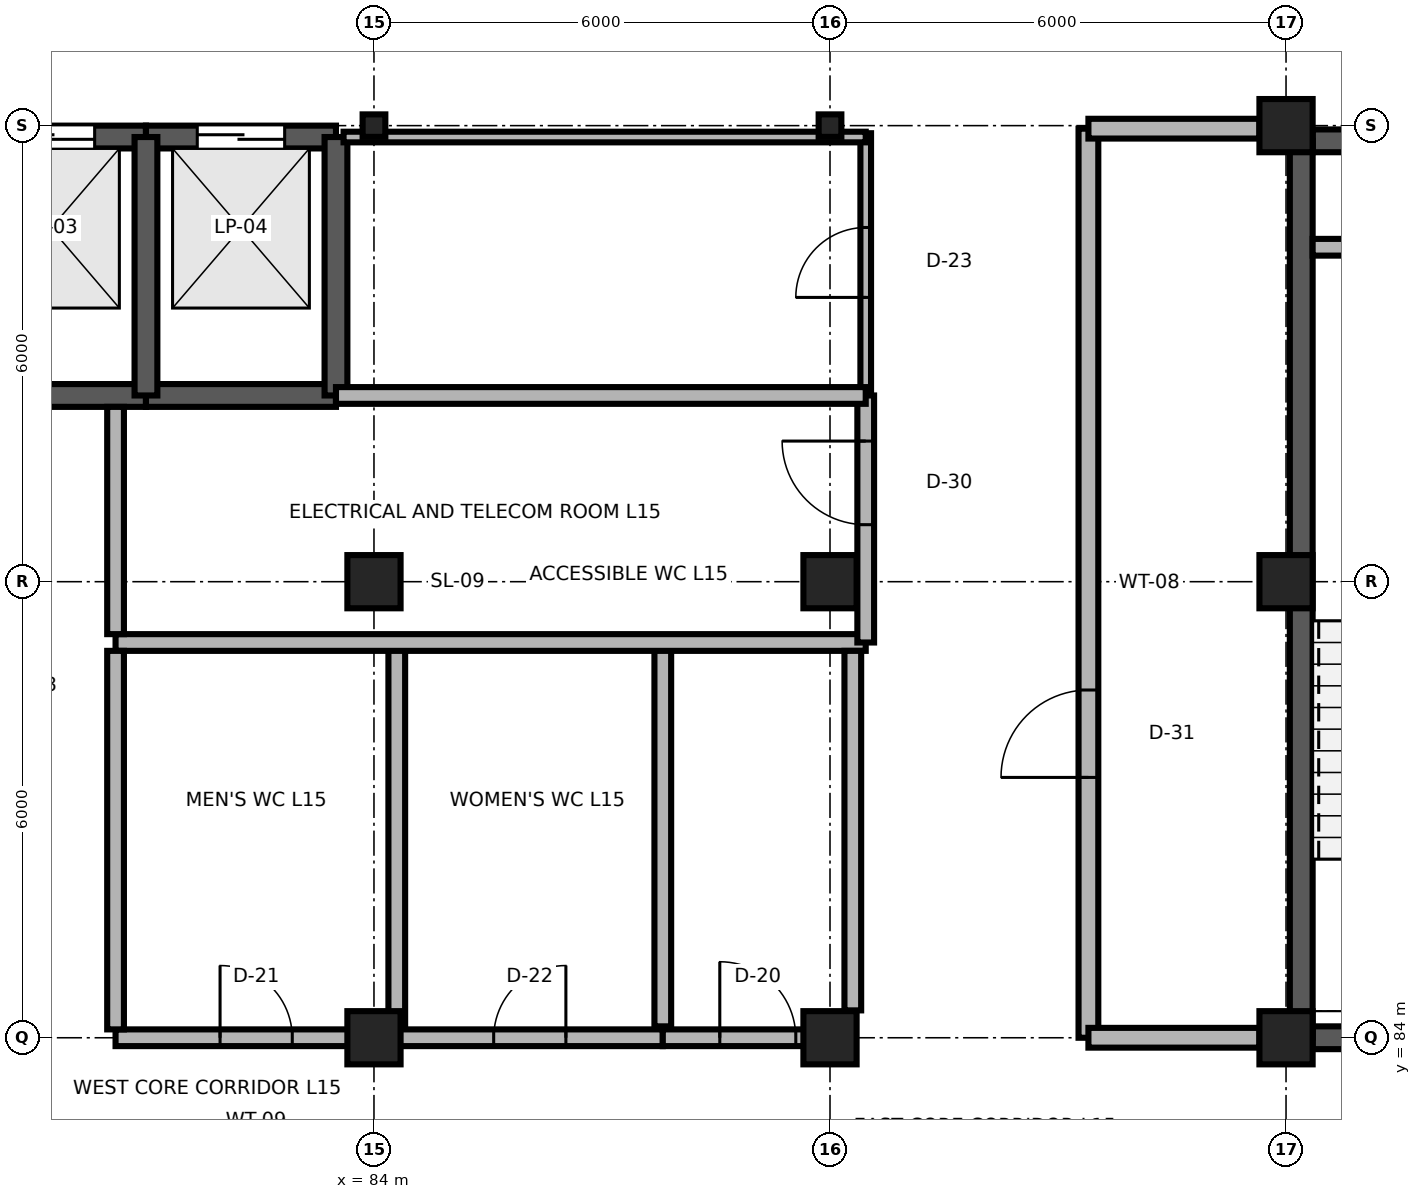
"""IFC4 building model, lengths in metres.
Left out: names, types, materials, properties, quantities, classifications, styles, units other than length and angle.
Written with IfcOpenShell. Run it as: python <this file> out.ifc"""

import sys

from ifc_helpers import new_model, si_unit, direction, frame, frame_2d, origin, origin_2d, place, context, subcontext, project, spatial, rectangle, i_section, extrude, element, fill, save


model = new_model("IFC4")
c1 = context("Model", 3, precision=1e-05, world=origin(), true_north=direction((0.0, 1.0)))
c2 = subcontext(c1, "Body", "Model", "MODEL_VIEW")
j1 = project(units=[si_unit("LENGTHUNIT", "METRE"), si_unit("PLANEANGLEUNIT", "RADIAN")], contexts=[c1])
p1 = place(None, origin())
s1 = spatial("IfcSite", under=j1, at=p1, CompositionType="ELEMENT")
p2 = place(p1, origin())
s2 = spatial("IfcBuilding", under=s1, at=p2, CompositionType="ELEMENT")
p3 = place(p2, frame((0.0, 0.0, 60.0)))
s3 = spatial("IfcBuildingStorey", under=s2, at=p3, CompositionType="ELEMENT", Elevation=60.0)
for number, where, z_axis, x_axis in (
    (1, (84.0, 84.0, 0.0), (0.0, 0.0, 1.0), (1.0, 0.0, 0.0)),
    (2, (90.0, 84.0, 0.0), (0.0, 0.0, 1.0), (1.0, 0.0, 0.0)),
    (3, (96.0, 84.0, 0.0), (0.0, 0.0, 1.0), (1.0, 0.0, 0.0)),
    (4, (84.0, 90.0, 0.0), (0.0, 0.0, 1.0), (1.0, 0.0, 0.0)),
    (5, (90.0, 90.0, 0.0), (0.0, 0.0, 1.0), (1.0, 0.0, 0.0)),
    (6, (96.0, 90.0, 0.0), (0.0, 0.0, 1.0), (1.0, 0.0, 0.0)),
):
    element("IfcColumn", number, at=place(p3, frame(where, z_axis=z_axis, x_axis=x_axis)), inside=s3, PredefinedType="COLUMN", context=c2, shape_type="SweptSolid", body=[
        extrude(rectangle(XDim=0.7, YDim=0.7, at=origin_2d()), origin(), (0.0, 0.0, 1.0), 3.9),
    ])
for number, where, z_axis, x_axis in (
    (7, (84.0, 96.0, 0.0), (0.0, 0.0, 1.0), (1.0, 0.0, 0.0)),
    (8, (90.0, 96.0, 0.0), (0.0, 0.0, 1.0), (1.0, 0.0, 0.0)),
):
    element("IfcColumn", number, at=place(p3, frame(where, z_axis=z_axis, x_axis=x_axis)), inside=s3, PredefinedType="COLUMN", context=c2, shape_type="SweptSolid", body=[
        extrude(i_section(OverallWidth=0.299, OverallDepth=0.296, WebThickness=0.009, FlangeThickness=0.014, FilletRadius=0.018, at=origin_2d()), origin(), (0.0, 0.0, 1.0), 3.9),
    ])
p4 = place(p3, frame((96.0, 96.0, 0.0), z_axis=(0.0, 0.0, 1.0), x_axis=(1.0, 0.0, 0.0)))
e9 = element("IfcColumn", 9, at=p4, inside=s3, PredefinedType="COLUMN", context=c2, shape_type="SweptSolid", body=[
    extrude(rectangle(XDim=0.7, YDim=0.7, at=origin_2d()), origin(), (0.0, 0.0, 1.0), 3.9),
])
p5 = place(p3, frame((96.35, 84.0, 0.0), z_axis=(0.0, 0.0, 1.0), x_axis=(1.0, 0.0, 0.0)))
e10 = element("IfcWall", 10, at=p5, inside=s3, PredefinedType="SHEAR", context=c2, shape_type="SweptSolid", body=[
    extrude(rectangle(XDim=5.3, YDim=0.3, at=frame_2d((2.65, 0.0))), origin(), (0.0, 0.0, 1.0), 3.66),
])
p6 = place(p5, frame((1.975, 0.0, 0.0)))
e11 = element("IfcOpeningElement", 11, at=p6, cuts=e10, PredefinedType="OPENING", context=c2, shape_type="SweptSolid", body=[
    extrude(rectangle(XDim=1.35, YDim=2.2, at=frame_2d((0.675, 1.1))), frame((0.0, 0.165, 0.0), z_axis=(0.0, -1.0, 0.0), x_axis=(1.0, 0.0, 0.0)), (0.0, 0.0, 1.0), 0.33),
])
p7 = place(p3, frame((96.35, 95.8, 0.0), z_axis=(0.0, 0.0, 1.0), x_axis=(1.0, 0.0, 0.0)))
e12 = element("IfcWall", 12, at=p7, inside=s3, PredefinedType="SHEAR", context=c2, shape_type="SweptSolid", body=[
    extrude(rectangle(XDim=5.3, YDim=0.3, at=frame_2d((2.65, 0.0))), origin(), (0.0, 0.0, 1.0), 3.74),
])
p8 = place(p3, frame((96.2, 84.0, 0.0), z_axis=(0.0, 0.0, 1.0), x_axis=(0.0, 1.0, 0.0)))
e13 = element("IfcWall", 13, at=p8, inside=s3, PredefinedType="SHEAR", context=c2, shape_type="SweptSolid", body=[
    extrude(rectangle(XDim=11.8, YDim=0.3, at=frame_2d((5.9, 0.0))), origin(), (0.0, 0.0, 1.0), 3.74),
])
p9 = place(p3, frame((96.35, 94.4, 0.0), z_axis=(0.0, 0.0, 1.0), x_axis=(1.0, 0.0, 0.0)))
e14 = element("IfcWall", 14, at=p9, inside=s3, PredefinedType="PARTITIONING", context=c2, shape_type="SweptSolid", body=[
    extrude(rectangle(XDim=1.1, YDim=0.22, at=frame_2d((0.55, 0.0))), origin(), (0.0, 0.0, 1.0), 3.74),
])
p10 = place(p3, frame((78.5, 95.85, 0.0), z_axis=(0.0, 0.0, 1.0), x_axis=(1.0, 0.0, 0.0)))
e15 = element("IfcWall", 15, at=p10, inside=s3, PredefinedType="SHEAR", context=c2, shape_type="SweptSolid", body=[
    extrude(rectangle(XDim=2.5, YDim=0.3, at=frame_2d((1.25, 0.0))), origin(), (0.0, 0.0, 1.0), 3.74),
])
p11 = place(p10, frame((0.675, 0.0, 0.0)))
e16 = element("IfcOpeningElement", 16, at=p11, cuts=e15, PredefinedType="OPENING", context=c2, shape_type="SweptSolid", body=[
    extrude(rectangle(XDim=1.15, YDim=2.15, at=frame_2d((0.575, 1.075))), frame((0.0, 0.165, 0.0), z_axis=(0.0, -1.0, 0.0), x_axis=(1.0, 0.0, 0.0)), (0.0, 0.0, 1.0), 0.33),
])
p12 = place(p3, frame((78.5, 92.45, 0.0), z_axis=(0.0, 0.0, 1.0), x_axis=(1.0, 0.0, 0.0)))
e17 = element("IfcWall", 17, at=p12, inside=s3, PredefinedType="SHEAR", context=c2, shape_type="SweptSolid", body=[
    extrude(rectangle(XDim=2.5, YDim=0.3, at=frame_2d((1.25, 0.0))), origin(), (0.0, 0.0, 1.0), 3.74),
])
p13 = place(p3, frame((81.0, 95.85, 0.0), z_axis=(0.0, 0.0, 1.0), x_axis=(1.0, 0.0, 0.0)))
e18 = element("IfcWall", 18, at=p13, inside=s3, PredefinedType="SHEAR", context=c2, shape_type="SweptSolid", body=[
    extrude(rectangle(XDim=2.5, YDim=0.3, at=frame_2d((1.25, 0.0))), origin(), (0.0, 0.0, 1.0), 3.74),
])
p14 = place(p13, frame((0.675, 0.0, 0.0)))
e19 = element("IfcOpeningElement", 19, at=p14, cuts=e18, PredefinedType="OPENING", context=c2, shape_type="SweptSolid", body=[
    extrude(rectangle(XDim=1.15, YDim=2.15, at=frame_2d((0.575, 1.075))), frame((0.0, 0.165, 0.0), z_axis=(0.0, -1.0, 0.0), x_axis=(1.0, 0.0, 0.0)), (0.0, 0.0, 1.0), 0.33),
])
p15 = place(p3, frame((81.0, 92.45, 0.0), z_axis=(0.0, 0.0, 1.0), x_axis=(1.0, 0.0, 0.0)))
e20 = element("IfcWall", 20, at=p15, inside=s3, PredefinedType="SHEAR", context=c2, shape_type="SweptSolid", body=[
    extrude(rectangle(XDim=2.5, YDim=0.3, at=frame_2d((1.25, 0.0))), origin(), (0.0, 0.0, 1.0), 3.74),
])
for number, where, z_axis, x_axis in (
    (21, (81.0, 92.45, 0.0), (0.0, 0.0, 1.0), (0.0, 1.0, 0.0)),
    (22, (83.5, 92.45, 0.0), (0.0, 0.0, 1.0), (0.0, 1.0, 0.0)),
):
    element("IfcWall", number, at=place(p3, frame(where, z_axis=z_axis, x_axis=x_axis)), inside=s3, PredefinedType="SHEAR", context=c2, shape_type="SweptSolid", body=[
        extrude(rectangle(XDim=3.4, YDim=0.3, at=frame_2d((1.7, 0.0))), origin(), (0.0, 0.0, 1.0), 3.74),
    ])
p16 = place(p3, frame((93.4, 84.0, 0.0), z_axis=(0.0, 0.0, 1.0), x_axis=(0.0, 1.0, 0.0)))
e23 = element("IfcWall", 23, at=p16, inside=s3, PredefinedType="PARTITIONING", context=c2, shape_type="SweptSolid", body=[
    extrude(rectangle(XDim=11.96, YDim=0.26, at=frame_2d((5.98, 0.0))), origin(), (0.0, 0.0, 1.0), 3.74),
])
p17 = place(p16, frame((3.425, 0.0, 0.0)))
e24 = element("IfcOpeningElement", 24, at=p17, cuts=e23, PredefinedType="OPENING", context=c2, shape_type="SweptSolid", body=[
    extrude(rectangle(XDim=1.15, YDim=2.2, at=frame_2d((0.575, 1.1))), frame((0.0, 0.145, 0.0), z_axis=(0.0, -1.0, 0.0), x_axis=(1.0, 0.0, 0.0)), (0.0, 0.0, 1.0), 0.29),
])
for number, where, z_axis, x_axis in (
    (25, (93.4, 84.0, 0.0), (0.0, 0.0, 1.0), (1.0, 0.0, 0.0)),
    (26, (93.4, 95.96, 0.0), (0.0, 0.0, 1.0), (1.0, 0.0, 0.0)),
):
    element("IfcWall", number, at=place(p3, frame(where, z_axis=z_axis, x_axis=x_axis)), inside=s3, PredefinedType="PARTITIONING", context=c2, shape_type="SweptSolid", body=[
        extrude(rectangle(XDim=2.25, YDim=0.26, at=frame_2d((1.125, 0.0))), origin(), (0.0, 0.0, 1.0), 3.449),
    ])
p18 = place(p3, frame((80.6, 84.0, 0.0), z_axis=(0.0, 0.0, 1.0), x_axis=(1.0, 0.0, 0.0)))
e27 = element("IfcWall", 27, at=p18, inside=s3, PredefinedType="PARTITIONING", context=c2, shape_type="SweptSolid", body=[
    extrude(rectangle(XDim=3.7, YDim=0.22, at=frame_2d((1.85, 0.0))), origin(), (0.0, 0.0, 1.0), 3.449),
])
p19 = place(p18, frame((1.375, 0.0, 0.0)))
e28 = element("IfcOpeningElement", 28, at=p19, cuts=e27, PredefinedType="OPENING", context=c2, shape_type="SweptSolid", body=[
    extrude(rectangle(XDim=0.95, YDim=2.15, at=frame_2d((0.475, 1.075))), frame((0.0, 0.125, 0.0), z_axis=(0.0, -1.0, 0.0), x_axis=(1.0, 0.0, 0.0)), (0.0, 0.0, 1.0), 0.25),
])
p20 = place(p3, frame((84.3, 84.0, 0.0), z_axis=(0.0, 0.0, 1.0), x_axis=(1.0, 0.0, 0.0)))
e29 = element("IfcWall", 29, at=p20, inside=s3, PredefinedType="PARTITIONING", context=c2, shape_type="SweptSolid", body=[
    extrude(rectangle(XDim=3.5, YDim=0.22, at=frame_2d((1.75, 0.0))), origin(), (0.0, 0.0, 1.0), 3.449),
])
p21 = place(p20, frame((1.275, 0.0, 0.0)))
e30 = element("IfcOpeningElement", 30, at=p21, cuts=e29, PredefinedType="OPENING", context=c2, shape_type="SweptSolid", body=[
    extrude(rectangle(XDim=0.95, YDim=2.1, at=frame_2d((0.475, 1.05))), frame((0.0, 0.125, 0.0), z_axis=(0.0, -1.0, 0.0), x_axis=(1.0, 0.0, 0.0)), (0.0, 0.0, 1.0), 0.25),
])
p22 = place(p3, frame((87.8, 84.0, 0.0), z_axis=(0.0, 0.0, 1.0), x_axis=(1.0, 0.0, 0.0)))
e31 = element("IfcWall", 31, at=p22, inside=s3, PredefinedType="PARTITIONING", context=c2, shape_type="SweptSolid", body=[
    extrude(rectangle(XDim=2.5, YDim=0.22, at=frame_2d((1.25, 0.0))), origin(), (0.0, 0.0, 1.0), 3.449),
])
p23 = place(p22, frame((0.75, 0.0, 0.0)))
e32 = element("IfcOpeningElement", 32, at=p23, cuts=e31, PredefinedType="OPENING", context=c2, shape_type="SweptSolid", body=[
    extrude(rectangle(XDim=1.0, YDim=2.15, at=frame_2d((0.5, 1.075))), frame((0.0, 0.125, 0.0), z_axis=(0.0, -1.0, 0.0), x_axis=(1.0, 0.0, 0.0)), (0.0, 0.0, 1.0), 0.25),
])
for number, where, z_axis, x_axis in (
    (33, (84.3, 84.15, 0.0), (0.0, 0.0, 1.0), (0.0, 1.0, 0.0)),
    (34, (87.8, 84.15, 0.0), (0.0, 0.0, 1.0), (0.0, 1.0, 0.0)),
):
    element("IfcWall", number, at=place(p3, frame(where, z_axis=z_axis, x_axis=x_axis)), inside=s3, PredefinedType="PARTITIONING", context=c2, shape_type="SweptSolid", body=[
        extrude(rectangle(XDim=5.0, YDim=0.22, at=frame_2d((2.5, 0.0))), origin(), (0.0, 0.0, 1.0), 3.74),
    ])
p24 = place(p3, frame((80.6, 89.2, 0.0), z_axis=(0.0, 0.0, 1.0), x_axis=(1.0, 0.0, 0.0)))
e35 = element("IfcWall", 35, at=p24, inside=s3, PredefinedType="PARTITIONING", context=c2, shape_type="SweptSolid", body=[
    extrude(rectangle(XDim=9.87, YDim=0.22, at=frame_2d((4.935, 0.0))), origin(), (0.0, 0.0, 1.0), 3.74),
])
p25 = place(p3, frame((90.47, 89.2, 0.0), z_axis=(0.0, 0.0, 1.0), x_axis=(0.0, 1.0, 0.0)))
e36 = element("IfcWall", 36, at=p25, inside=s3, PredefinedType="PARTITIONING", context=c2, shape_type="SweptSolid", body=[
    extrude(rectangle(XDim=3.25, YDim=0.22, at=frame_2d((1.625, 0.0))), origin(), (0.0, 0.0, 1.0), 3.74),
])
p26 = place(p25, frame((1.55, 0.0, 0.0)))
e37 = element("IfcOpeningElement", 37, at=p26, cuts=e36, PredefinedType="OPENING", context=c2, shape_type="SweptSolid", body=[
    extrude(rectangle(XDim=1.1, YDim=2.15, at=frame_2d((0.55, 1.075))), frame((0.0, 0.125, 0.0), z_axis=(0.0, -1.0, 0.0), x_axis=(1.0, 0.0, 0.0)), (0.0, 0.0, 1.0), 0.25),
])
p27 = place(p3, frame((90.47, 92.5, 0.0), z_axis=(0.0, 0.0, 1.0), x_axis=(0.0, 1.0, 0.0)))
e38 = element("IfcWall", 38, at=p27, inside=s3, PredefinedType="PARTITIONING", context=c2, shape_type="SweptSolid", body=[
    extrude(rectangle(XDim=3.4, YDim=0.14, at=frame_2d((1.7, 0.0))), origin(), (0.0, 0.0, 1.0), 3.74),
])
p28 = place(p27, frame((1.24, 0.0, 0.0)))
e39 = element("IfcOpeningElement", 39, at=p28, cuts=e38, PredefinedType="OPENING", context=c2, shape_type="SweptSolid", body=[
    extrude(rectangle(XDim=0.92, YDim=2.15, at=frame_2d((0.46, 1.075))), frame((0.0, 0.085, 0.0), z_axis=(0.0, -1.0, 0.0), x_axis=(1.0, 0.0, 0.0)), (0.0, 0.0, 1.0), 0.17),
])
p29 = place(p3, frame((83.6, 95.85, 0.0), z_axis=(0.0, 0.0, 1.0), x_axis=(1.0, 0.0, 0.0)))
e40 = element("IfcWall", 40, at=p29, inside=s3, PredefinedType="PARTITIONING", context=c2, shape_type="SweptSolid", body=[
    extrude(rectangle(XDim=6.87, YDim=0.14, at=frame_2d((3.435, 0.0))), origin(), (0.0, 0.0, 1.0), 3.74),
])
p30 = place(p3, frame((80.6, 84.11, 0.0), z_axis=(0.0, 0.0, 1.0), x_axis=(0.0, 1.0, 0.0)))
e41 = element("IfcWall", 41, at=p30, inside=s3, PredefinedType="PARTITIONING", context=c2, shape_type="SweptSolid", body=[
    extrude(rectangle(XDim=4.98, YDim=0.22, at=frame_2d((2.49, 0.0))), origin(), (0.0, 0.0, 1.0), 3.74),
])
p31 = place(p3, frame((90.3, 84.36, 0.0), z_axis=(0.0, 0.0, 1.0), x_axis=(0.0, 1.0, 0.0)))
e42 = element("IfcWall", 42, at=p31, inside=s3, PredefinedType="PARTITIONING", context=c2, shape_type="SweptSolid", body=[
    extrude(rectangle(XDim=4.73, YDim=0.22, at=frame_2d((2.365, 0.0))), origin(), (0.0, 0.0, 1.0), 3.74),
])
p32 = place(p3, frame((80.6, 89.31, 0.0), z_axis=(0.0, 0.0, 1.0), x_axis=(0.0, 1.0, 0.0)))
e43 = element("IfcWall", 43, at=p32, inside=s3, PredefinedType="PARTITIONING", context=c2, shape_type="SweptSolid", body=[
    extrude(rectangle(XDim=2.99, YDim=0.22, at=frame_2d((1.495, 0.0))), origin(), (0.0, 0.0, 1.0), 3.74),
])
p33 = place(p3, frame((83.5, 92.45, 0.0), z_axis=(0.0, 0.0, 1.0), x_axis=(1.0, 0.0, 0.0)))
e44 = element("IfcWall", 44, at=p33, inside=s3, PredefinedType="PARTITIONING", context=c2, shape_type="SweptSolid", body=[
    extrude(rectangle(XDim=6.97, YDim=0.22, at=frame_2d((3.485, 0.0))), origin(), (0.0, 0.0, 1.0), 3.74),
])
p34 = place(p11, origin())
e45 = element("IfcDoor", 45, at=p34, inside=s3, OperationType="DOUBLE_DOOR_SLIDING", PredefinedType="DOOR", context=c2, shape_type="SweptSolid", body=[
    extrude(rectangle(XDim=1.15, YDim=2.15, at=frame_2d((0.575, 1.075))), frame((0.0, 0.025, 0.0), z_axis=(0.0, -1.0, 0.0), x_axis=(1.0, 0.0, 0.0)), (0.0, 0.0, 1.0), 0.05),
])
fill(e16, e45)
p35 = place(p14, origin())
e46 = element("IfcDoor", 46, at=p35, inside=s3, OperationType="DOUBLE_DOOR_SLIDING", PredefinedType="DOOR", context=c2, shape_type="SweptSolid", body=[
    extrude(rectangle(XDim=1.15, YDim=2.15, at=frame_2d((0.575, 1.075))), frame((0.0, 0.025, 0.0), z_axis=(0.0, -1.0, 0.0), x_axis=(1.0, 0.0, 0.0)), (0.0, 0.0, 1.0), 0.05),
])
fill(e19, e46)
p36 = place(p17, origin())
e47 = element("IfcDoor", 47, at=p36, inside=s3, OperationType="SINGLE_SWING_LEFT", PredefinedType="DOOR", context=c2, shape_type="SweptSolid", body=[
    extrude(rectangle(XDim=1.15, YDim=2.2, at=frame_2d((0.575, 1.1))), frame((0.0, 0.025, 0.0), z_axis=(0.0, -1.0, 0.0), x_axis=(1.0, 0.0, 0.0)), (0.0, 0.0, 1.0), 0.05),
])
fill(e24, e47)
p37 = place(p19, origin())
e48 = element("IfcDoor", 48, at=p37, inside=s3, OperationType="SINGLE_SWING_LEFT", PredefinedType="DOOR", context=c2, shape_type="SweptSolid", body=[
    extrude(rectangle(XDim=0.95, YDim=2.15, at=frame_2d((0.475, 1.075))), frame((0.0, 0.025, 0.0), z_axis=(0.0, -1.0, 0.0), x_axis=(1.0, 0.0, 0.0)), (0.0, 0.0, 1.0), 0.05),
])
fill(e28, e48)
p38 = place(p21, origin())
e49 = element("IfcDoor", 49, at=p38, inside=s3, OperationType="SINGLE_SWING_RIGHT", PredefinedType="DOOR", context=c2, shape_type="SweptSolid", body=[
    extrude(rectangle(XDim=0.95, YDim=2.1, at=frame_2d((0.475, 1.05))), frame((0.0, 0.025, 0.0), z_axis=(0.0, -1.0, 0.0), x_axis=(1.0, 0.0, 0.0)), (0.0, 0.0, 1.0), 0.05),
])
fill(e30, e49)
p39 = place(p23, origin())
e50 = element("IfcDoor", 50, at=p39, inside=s3, OperationType="SINGLE_SWING_LEFT", PredefinedType="DOOR", context=c2, shape_type="SweptSolid", body=[
    extrude(rectangle(XDim=1.0, YDim=2.15, at=frame_2d((0.5, 1.075))), frame((0.0, 0.025, 0.0), z_axis=(0.0, -1.0, 0.0), x_axis=(1.0, 0.0, 0.0)), (0.0, 0.0, 1.0), 0.05),
])
fill(e32, e50)
p40 = place(p26, origin())
e51 = element("IfcDoor", 51, at=p40, inside=s3, OperationType="SINGLE_SWING_RIGHT", PredefinedType="DOOR", context=c2, shape_type="SweptSolid", body=[
    extrude(rectangle(XDim=1.1, YDim=2.15, at=frame_2d((0.55, 1.075))), frame((0.0, 0.025, 0.0), z_axis=(0.0, -1.0, 0.0), x_axis=(1.0, 0.0, 0.0)), (0.0, 0.0, 1.0), 0.05),
])
fill(e37, e51)
p41 = place(p28, origin())
e52 = element("IfcDoor", 52, at=p41, inside=s3, OperationType="SINGLE_SWING_LEFT", PredefinedType="DOOR", context=c2, shape_type="SweptSolid", body=[
    extrude(rectangle(XDim=0.92, YDim=2.15, at=frame_2d((0.46, 1.075))), frame((0.0, 0.025, 0.0), z_axis=(0.0, -1.0, 0.0), x_axis=(1.0, 0.0, 0.0)), (0.0, 0.0, 1.0), 0.05),
])
fill(e39, e52)
save(model, sys.argv[1])
